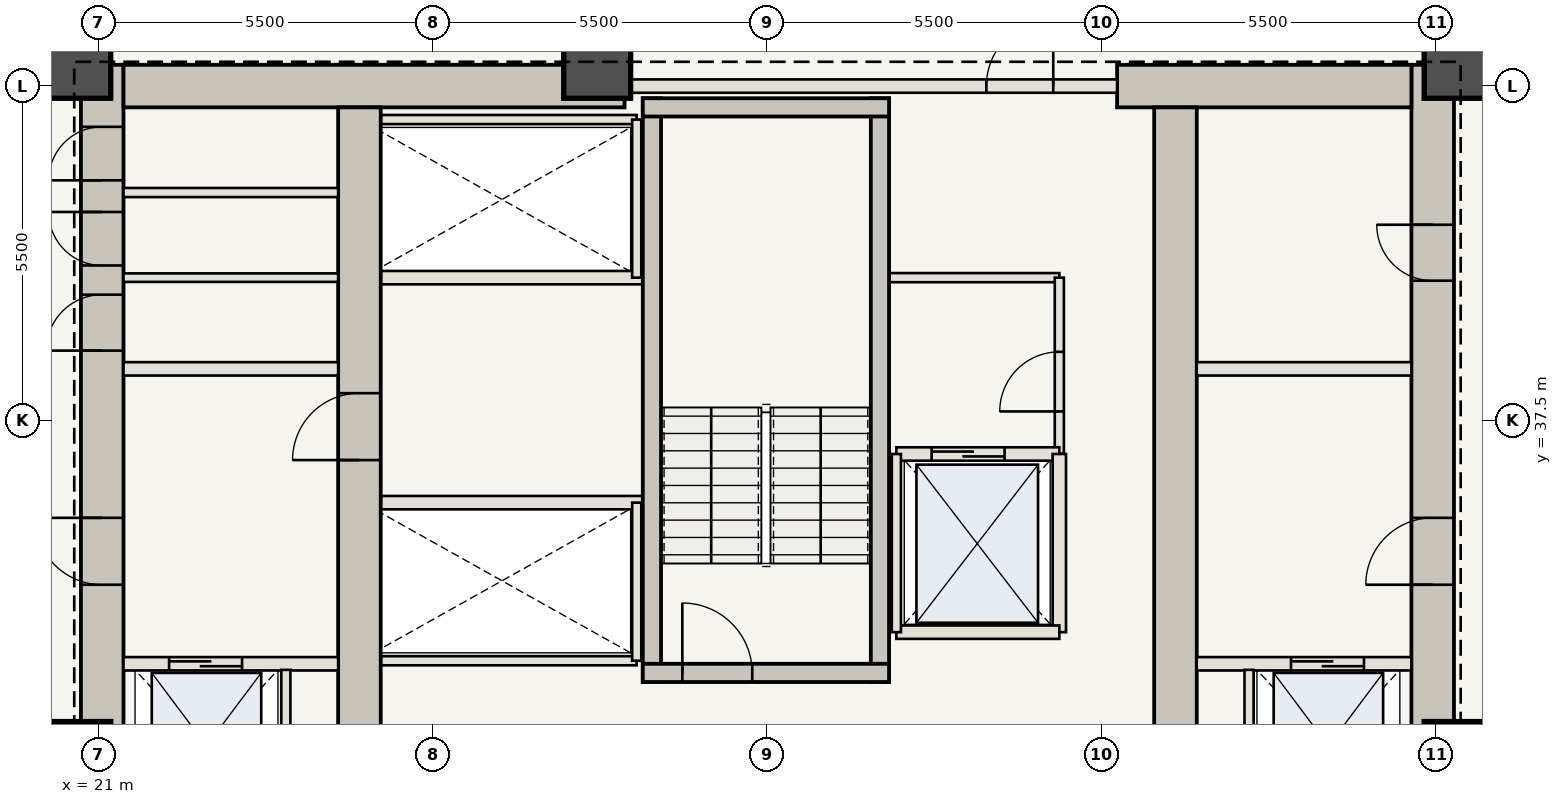
"""IFC4 building model, lengths in metres.
Left out: names, types, materials, properties, quantities, classifications, styles, units other than length and angle.
Written with IfcOpenShell. Run it as: python <this file> out.ifc"""

import sys

from ifc_helpers import new_model, si_unit, direction, frame, frame_2d, origin, origin_2d, place, context, subcontext, project, spatial, rectangle, extrude, element, fill, save


model = new_model("IFC4")
c1 = context("Model", 3, precision=1e-05, world=origin(), true_north=direction((0.0, 1.0)))
c2 = subcontext(c1, "Body", "Model", "MODEL_VIEW")
j1 = project(units=[si_unit("LENGTHUNIT", "METRE"), si_unit("PLANEANGLEUNIT", "RADIAN")], contexts=[c1])
p1 = place(None, origin())
s1 = spatial("IfcSite", under=j1, at=p1, CompositionType="ELEMENT")
p2 = place(p1, origin())
s2 = spatial("IfcBuilding", under=s1, at=p2, CompositionType="ELEMENT")
p3 = place(p2, frame((0.0, 0.0, 42.35)))
s3 = spatial("IfcBuildingStorey", under=s2, at=p3, CompositionType="ELEMENT", Elevation=42.35)
p4 = place(p3, frame((21.06, 30.6, 0.0), z_axis=(0.0, 0.0, 1.0), x_axis=(0.0, 1.0, 0.0)))
e1 = element("IfcWall", 1, at=p4, inside=s3, PredefinedType="SHEAR", context=c2, shape_type="SweptSolid", body=[
    extrude(rectangle(XDim=12.75, YDim=0.7, at=frame_2d((6.375, 0.0))), origin(), (0.0, 0.0, 1.0), 3.5),
])
p5 = place(p4, frame((4.2, 0.0, 0.0)))
e2 = element("IfcOpeningElement", 2, at=p5, cuts=e1, PredefinedType="OPENING", context=c2, shape_type="SweptSolid", body=[
    extrude(rectangle(XDim=1.1, YDim=2.15, at=frame_2d((0.55, 1.075))), frame((0.0, 0.36, 0.0), z_axis=(0.0, -1.0, 0.0), x_axis=(1.0, 0.0, 0.0)), (0.0, 0.0, 1.0), 0.72),
])
p6 = place(p4, frame((8.05, 0.0, 0.0)))
e3 = element("IfcOpeningElement", 3, at=p6, cuts=e1, PredefinedType="OPENING", context=c2, shape_type="SweptSolid", body=[
    extrude(rectangle(XDim=0.92, YDim=2.1, at=frame_2d((0.46, 1.05))), frame((0.0, 0.36, 0.0), z_axis=(0.0, -1.0, 0.0), x_axis=(1.0, 0.0, 0.0)), (0.0, 0.0, 1.0), 0.72),
])
p7 = place(p4, frame((9.45, 0.0, 0.0)))
e4 = element("IfcOpeningElement", 4, at=p7, cuts=e1, PredefinedType="OPENING", context=c2, shape_type="SweptSolid", body=[
    extrude(rectangle(XDim=0.88, YDim=2.1, at=frame_2d((0.44, 1.05))), frame((0.0, 0.36, 0.0), z_axis=(0.0, -1.0, 0.0), x_axis=(1.0, 0.0, 0.0)), (0.0, 0.0, 1.0), 0.72),
])
p8 = place(p4, frame((10.85, 0.0, 0.0)))
e5 = element("IfcOpeningElement", 5, at=p8, cuts=e1, PredefinedType="OPENING", context=c2, shape_type="SweptSolid", body=[
    extrude(rectangle(XDim=0.88, YDim=2.1, at=frame_2d((0.44, 1.05))), frame((0.0, 0.36, 0.0), z_axis=(0.0, -1.0, 0.0), x_axis=(1.0, 0.0, 0.0)), (0.0, 0.0, 1.0), 0.72),
])
p9 = place(p3, frame((42.94, 30.6, 0.0), z_axis=(0.0, 0.0, 1.0), x_axis=(0.0, 1.0, 0.0)))
e6 = element("IfcWall", 6, at=p9, inside=s3, PredefinedType="SHEAR", context=c2, shape_type="SweptSolid", body=[
    extrude(rectangle(XDim=12.75, YDim=0.7, at=frame_2d((6.375, 0.0))), origin(), (0.0, 0.0, 1.0), 3.5),
])
p10 = place(p9, frame((4.2, 0.0, 0.0)))
e7 = element("IfcOpeningElement", 7, at=p10, cuts=e6, PredefinedType="OPENING", context=c2, shape_type="SweptSolid", body=[
    extrude(rectangle(XDim=1.1, YDim=2.15, at=frame_2d((0.55, 1.075))), frame((0.0, 0.36, 0.0), z_axis=(0.0, -1.0, 0.0), x_axis=(1.0, 0.0, 0.0)), (0.0, 0.0, 1.0), 0.72),
])
p11 = place(p9, frame((9.2, 0.0, 0.0)))
e8 = element("IfcOpeningElement", 8, at=p11, cuts=e6, PredefinedType="OPENING", context=c2, shape_type="SweptSolid", body=[
    extrude(rectangle(XDim=0.92, YDim=2.1, at=frame_2d((0.46, 1.05))), frame((0.0, 0.36, 0.0), z_axis=(0.0, -1.0, 0.0), x_axis=(1.0, 0.0, 0.0)), (0.0, 0.0, 1.0), 0.72),
])
p12 = place(p3, frame((21.41, 43.0, 0.0), z_axis=(0.0, 0.0, 1.0), x_axis=(1.0, 0.0, 0.0)))
e9 = element("IfcWall", 9, at=p12, inside=s3, PredefinedType="SHEAR", context=c2, shape_type="SweptSolid", body=[
    extrude(rectangle(XDim=8.24, YDim=0.7, at=frame_2d((4.12, 0.0))), origin(), (0.0, 0.0, 1.0), 3.5),
])
p13 = place(p3, frame((37.75, 43.0, 0.0), z_axis=(0.0, 0.0, 1.0), x_axis=(1.0, 0.0, 0.0)))
e10 = element("IfcWall", 10, at=p13, inside=s3, PredefinedType="SHEAR", context=c2, shape_type="SweptSolid", body=[
    extrude(rectangle(XDim=4.84, YDim=0.7, at=frame_2d((2.42, 0.0))), origin(), (0.0, 0.0, 1.0), 3.5),
])
p14 = place(p3, frame((25.29, 30.6, 0.0), z_axis=(0.0, 0.0, 1.0), x_axis=(0.0, 1.0, 0.0)))
e11 = element("IfcWall", 11, at=p14, inside=s3, PredefinedType="SHEAR", context=c2, shape_type="SweptSolid", body=[
    extrude(rectangle(XDim=12.05, YDim=0.7, at=frame_2d((6.025, 0.0))), origin(), (0.0, 0.0, 1.0), 3.5),
])
p15 = place(p14, frame((6.25, 0.0, 0.0)))
e12 = element("IfcOpeningElement", 12, at=p15, cuts=e11, PredefinedType="OPENING", context=c2, shape_type="SweptSolid", body=[
    extrude(rectangle(XDim=1.1, YDim=2.15, at=frame_2d((0.55, 1.075))), frame((0.0, 0.36, 0.0), z_axis=(0.0, -1.0, 0.0), x_axis=(1.0, 0.0, 0.0)), (0.0, 0.0, 1.0), 0.72),
])
p16 = place(p3, frame((38.71, 30.6, 0.0), z_axis=(0.0, 0.0, 1.0), x_axis=(0.0, 1.0, 0.0)))
e13 = element("IfcWall", 13, at=p16, inside=s3, PredefinedType="SHEAR", context=c2, shape_type="SweptSolid", body=[
    extrude(rectangle(XDim=12.05, YDim=0.7, at=frame_2d((6.025, 0.0))), origin(), (0.0, 0.0, 1.0), 3.5),
])
for number, where, z_axis, x_axis in (
    (14, (43.35, 32.0, 0.0), (0.0, 0.0, 1.0), (1.0, 0.0, 0.0)),
    (15, (43.35, 43.35, 0.0), (0.0, 0.0, 1.0), (1.0, 0.0, 0.0)),
    (16, (29.2, 43.35, 0.0), (0.0, 0.0, 1.0), (1.0, 0.0, 0.0)),
    (17, (20.65, 43.35, 0.0), (0.0, 0.0, 1.0), (1.0, 0.0, 0.0)),
    (18, (20.65, 32.0, 0.0), (0.0, 0.0, 1.0), (1.0, 0.0, 0.0)),
):
    element("IfcColumn", number, at=place(p3, frame(where, z_axis=z_axis, x_axis=x_axis)), inside=s3, PredefinedType="COLUMN", context=c2, shape_type="SweptSolid", body=[
        extrude(rectangle(XDim=1.1, YDim=1.1, at=origin_2d()), origin(), (0.0, 0.0, 1.0), 3.5),
    ])
p17 = place(p3, frame((21.41, 33.5, 0.0), z_axis=(0.0, 0.0, 1.0), x_axis=(1.0, 0.0, 0.0)))
e19 = element("IfcWall", 19, at=p17, inside=s3, PredefinedType="STANDARD", context=c2, shape_type="SweptSolid", body=[
    extrude(rectangle(XDim=3.53, YDim=0.22, at=frame_2d((1.765, 0.0))), origin(), (0.0, 0.0, 1.0), 3.32),
])
p18 = place(p17, frame((0.75, 0.0, 0.0)))
e20 = element("IfcOpeningElement", 20, at=p18, cuts=e19, PredefinedType="OPENING", context=c2, shape_type="SweptSolid", body=[
    extrude(rectangle(XDim=1.2, YDim=2.2, at=frame_2d((0.6, 1.1))), frame((0.0, 0.12, 0.0), z_axis=(0.0, -1.0, 0.0), x_axis=(1.0, 0.0, 0.0)), (0.0, 0.0, 1.0), 0.24),
])
p19 = place(p3, frame((24.08, 30.75, 0.0), z_axis=(0.0, 0.0, 1.0), x_axis=(0.0, 1.0, 0.0)))
e21 = element("IfcWall", 21, at=p19, inside=s3, PredefinedType="STANDARD", context=c2, shape_type="SweptSolid", body=[
    extrude(rectangle(XDim=2.65, YDim=0.15, at=frame_2d((1.325, 0.0))), origin(), (0.0, 0.0, 1.0), 3.32),
])
p20 = place(p3, frame((39.06, 33.5, 0.0), z_axis=(0.0, 0.0, 1.0), x_axis=(1.0, 0.0, 0.0)))
e22 = element("IfcWall", 22, at=p20, inside=s3, PredefinedType="STANDARD", context=c2, shape_type="SweptSolid", body=[
    extrude(rectangle(XDim=3.53, YDim=0.22, at=frame_2d((1.765, 0.0))), origin(), (0.0, 0.0, 1.0), 3.32),
])
p21 = place(p20, frame((1.55, 0.0, 0.0)))
e23 = element("IfcOpeningElement", 23, at=p21, cuts=e22, PredefinedType="OPENING", context=c2, shape_type="SweptSolid", body=[
    extrude(rectangle(XDim=1.2, YDim=2.2, at=frame_2d((0.6, 1.1))), frame((0.0, 0.12, 0.0), z_axis=(0.0, -1.0, 0.0), x_axis=(1.0, 0.0, 0.0)), (0.0, 0.0, 1.0), 0.24),
])
p22 = place(p3, frame((39.92, 30.75, 0.0), z_axis=(0.0, 0.0, 1.0), x_axis=(0.0, 1.0, 0.0)))
e24 = element("IfcWall", 24, at=p22, inside=s3, PredefinedType="STANDARD", context=c2, shape_type="SweptSolid", body=[
    extrude(rectangle(XDim=2.65, YDim=0.15, at=frame_2d((1.325, 0.0))), origin(), (0.0, 0.0, 1.0), 3.32),
])
for number, where, z_axis, x_axis in (
    (25, (21.41, 38.35, 0.0), (0.0, 0.0, 1.0), (1.0, 0.0, 0.0)),
    (26, (39.06, 38.35, 0.0), (0.0, 0.0, 1.0), (1.0, 0.0, 0.0)),
):
    element("IfcWall", number, at=place(p3, frame(where, z_axis=z_axis, x_axis=x_axis)), inside=s3, PredefinedType="STANDARD", context=c2, shape_type="SweptSolid", body=[
        extrude(rectangle(XDim=3.53, YDim=0.22, at=frame_2d((1.765, 0.0))), origin(), (0.0, 0.0, 1.0), 3.32),
    ])
p23 = place(p3, frame((21.41, 39.85, 0.0), z_axis=(0.0, 0.0, 1.0), x_axis=(1.0, 0.0, 0.0)))
e27 = element("IfcWall", 27, at=p23, inside=s3, PredefinedType="STANDARD", context=c2, shape_type="SweptSolid", body=[
    extrude(rectangle(XDim=3.53, YDim=0.14, at=frame_2d((1.765, 0.0))), origin(), (0.0, 0.0, 1.0), 3.32),
])
p24 = place(p3, frame((21.41, 41.25, 0.0), z_axis=(0.0, 0.0, 1.0), x_axis=(1.0, 0.0, 0.0)))
e28 = element("IfcWall", 28, at=p24, inside=s3, PredefinedType="STANDARD", context=c2, shape_type="SweptSolid", body=[
    extrude(rectangle(XDim=3.53, YDim=0.15, at=frame_2d((1.765, 0.0))), origin(), (0.0, 0.0, 1.0), 3.32),
])
p25 = place(p3, frame((34.0, 39.85, 0.0), z_axis=(0.0, 0.0, 1.0), x_axis=(1.0, 0.0, 0.0)))
e29 = element("IfcWall", 29, at=p25, inside=s3, PredefinedType="STANDARD", context=c2, shape_type="SweptSolid", body=[
    extrude(rectangle(XDim=2.8, YDim=0.15, at=frame_2d((1.4, 0.0))), origin(), (0.0, 0.0, 1.0), 3.32),
])
p26 = place(p3, frame((36.8, 36.95, 0.0), z_axis=(0.0, 0.0, 1.0), x_axis=(0.0, 1.0, 0.0)))
e30 = element("IfcWall", 30, at=p26, inside=s3, PredefinedType="STANDARD", context=c2, shape_type="SweptSolid", body=[
    extrude(rectangle(XDim=2.9, YDim=0.15, at=frame_2d((1.45, 0.0))), origin(), (0.0, 0.0, 1.0), 3.32),
])
p27 = place(p26, frame((0.7, 0.0, 0.0)))
e31 = element("IfcOpeningElement", 31, at=p27, cuts=e30, PredefinedType="OPENING", context=c2, shape_type="SweptSolid", body=[
    extrude(rectangle(XDim=0.98, YDim=2.2, at=frame_2d((0.49, 1.1))), frame((0.0, 0.085, 0.0), z_axis=(0.0, -1.0, 0.0), x_axis=(1.0, 0.0, 0.0)), (0.0, 0.0, 1.0), 0.17),
])
p28 = place(p3, frame((25.65, 36.15, 0.0), z_axis=(0.0, 0.0, 1.0), x_axis=(1.0, 0.0, 0.0)))
e32 = element("IfcWall", 32, at=p28, inside=s3, PredefinedType="STANDARD", context=c2, shape_type="SweptSolid", body=[
    extrude(rectangle(XDim=4.3, YDim=0.22, at=frame_2d((2.15, 0.0))), origin(), (0.0, 0.0, 1.0), 3.32),
])
p29 = place(p3, frame((25.65, 33.55, 0.0), z_axis=(0.0, 0.0, 1.0), x_axis=(1.0, 0.0, 0.0)))
e33 = element("IfcWall", 33, at=p29, inside=s3, PredefinedType="STANDARD", context=c2, shape_type="SweptSolid", body=[
    extrude(rectangle(XDim=4.2, YDim=0.15, at=frame_2d((2.1, 0.0))), origin(), (0.0, 0.0, 1.0), 3.32),
])
p30 = place(p3, frame((29.85, 33.55, 0.0), z_axis=(0.0, 0.0, 1.0), x_axis=(0.0, 1.0, 0.0)))
e34 = element("IfcWall", 34, at=p30, inside=s3, PredefinedType="STANDARD", context=c2, shape_type="SweptSolid", body=[
    extrude(rectangle(XDim=2.6, YDim=0.15, at=frame_2d((1.3, 0.0))), origin(), (0.0, 0.0, 1.0), 3.32),
])
p31 = place(p3, frame((25.65, 39.85, 0.0), z_axis=(0.0, 0.0, 1.0), x_axis=(1.0, 0.0, 0.0)))
e35 = element("IfcWall", 35, at=p31, inside=s3, PredefinedType="STANDARD", context=c2, shape_type="SweptSolid", body=[
    extrude(rectangle(XDim=4.3, YDim=0.22, at=frame_2d((2.15, 0.0))), origin(), (0.0, 0.0, 1.0), 3.32),
])
p32 = place(p3, frame((25.65, 42.45, 0.0), z_axis=(0.0, 0.0, 1.0), x_axis=(1.0, 0.0, 0.0)))
e36 = element("IfcWall", 36, at=p32, inside=s3, PredefinedType="STANDARD", context=c2, shape_type="SweptSolid", body=[
    extrude(rectangle(XDim=4.2, YDim=0.15, at=frame_2d((2.1, 0.0))), origin(), (0.0, 0.0, 1.0), 3.32),
])
p33 = place(p3, frame((29.85, 39.85, 0.0), z_axis=(0.0, 0.0, 1.0), x_axis=(0.0, 1.0, 0.0)))
e37 = element("IfcWall", 37, at=p33, inside=s3, PredefinedType="STANDARD", context=c2, shape_type="SweptSolid", body=[
    extrude(rectangle(XDim=2.6, YDim=0.15, at=frame_2d((1.3, 0.0))), origin(), (0.0, 0.0, 1.0), 3.32),
])
for number, where, z_axis, x_axis in (
    (38, (30.1, 33.2, 0.0), (0.0, 0.0, 1.0), (0.0, 1.0, 0.0)),
    (39, (33.85, 33.2, 0.0), (0.0, 0.0, 1.0), (0.0, 1.0, 0.0)),
):
    element("IfcWall", number, at=place(p3, frame(where, z_axis=z_axis, x_axis=x_axis)), inside=s3, PredefinedType="SHEAR", context=c2, shape_type="SweptSolid", body=[
        extrude(rectangle(XDim=9.6, YDim=0.3, at=frame_2d((4.8, 0.0))), origin(), (0.0, 0.0, 1.0), 3.32),
    ])
p34 = place(p3, frame((29.95, 33.35, 0.0), z_axis=(0.0, 0.0, 1.0), x_axis=(1.0, 0.0, 0.0)))
e40 = element("IfcWall", 40, at=p34, inside=s3, PredefinedType="SHEAR", context=c2, shape_type="SweptSolid", body=[
    extrude(rectangle(XDim=4.05, YDim=0.3, at=frame_2d((2.025, 0.0))), origin(), (0.0, 0.0, 1.0), 3.32),
])
p35 = place(p34, frame((0.65, 0.0, 0.0)))
e41 = element("IfcOpeningElement", 41, at=p35, cuts=e40, PredefinedType="OPENING", context=c2, shape_type="SweptSolid", body=[
    extrude(rectangle(XDim=1.15, YDim=2.15, at=frame_2d((0.575, 1.075))), frame((0.0, 0.16, 0.0), z_axis=(0.0, -1.0, 0.0), x_axis=(1.0, 0.0, 0.0)), (0.0, 0.0, 1.0), 0.32),
])
p36 = place(p3, frame((29.95, 42.65, 0.0), z_axis=(0.0, 0.0, 1.0), x_axis=(1.0, 0.0, 0.0)))
e42 = element("IfcWall", 42, at=p36, inside=s3, PredefinedType="SHEAR", context=c2, shape_type="SweptSolid", body=[
    extrude(rectangle(XDim=4.05, YDim=0.3, at=frame_2d((2.025, 0.0))), origin(), (0.0, 0.0, 1.0), 3.32),
])
p37 = place(p3, frame((29.65, 43.0, 0.0), z_axis=(0.0, 0.0, 1.0), x_axis=(1.0, 0.0, 0.0)))
e43 = element("IfcWall", 43, at=p37, inside=s3, PredefinedType="STANDARD", context=c2, shape_type="SweptSolid", body=[
    extrude(rectangle(XDim=8.1, YDim=0.22, at=frame_2d((4.05, 0.0))), origin(), (0.0, 0.0, 1.0), 3.32),
])
p38 = place(p37, frame((5.95, 0.0, 0.0)))
e44 = element("IfcOpeningElement", 44, at=p38, cuts=e43, PredefinedType="OPENING", context=c2, shape_type="SweptSolid", body=[
    extrude(rectangle(XDim=1.1, YDim=2.15, at=frame_2d((0.55, 1.075))), frame((0.0, 0.12, 0.0), z_axis=(0.0, -1.0, 0.0), x_axis=(1.0, 0.0, 0.0)), (0.0, 0.0, 1.0), 0.24),
])
p39 = place(p3, frame((34.12, 36.95, 0.0), z_axis=(0.0, 0.0, 1.0), x_axis=(1.0, 0.0, 0.0)))
e45 = element("IfcWall", 45, at=p39, inside=s3, PredefinedType="STANDARD", context=c2, shape_type="SweptSolid", body=[
    extrude(rectangle(XDim=2.68, YDim=0.22, at=frame_2d((1.34, 0.0))), origin(), (0.0, 0.0, 1.0), 3.32),
])
p40 = place(p39, frame((0.58, 0.0, 0.0)))
e46 = element("IfcOpeningElement", 46, at=p40, cuts=e45, PredefinedType="OPENING", context=c2, shape_type="SweptSolid", body=[
    extrude(rectangle(XDim=1.2, YDim=2.2, at=frame_2d((0.6, 1.1))), frame((0.0, 0.12, 0.0), z_axis=(0.0, -1.0, 0.0), x_axis=(1.0, 0.0, 0.0)), (0.0, 0.0, 1.0), 0.24),
])
p41 = place(p3, frame((36.8, 34.02, 0.0), z_axis=(0.0, 0.0, 1.0), x_axis=(0.0, 1.0, 0.0)))
e47 = element("IfcWall", 47, at=p41, inside=s3, PredefinedType="STANDARD", context=c2, shape_type="SweptSolid", body=[
    extrude(rectangle(XDim=2.93, YDim=0.22, at=frame_2d((1.465, 0.0))), origin(), (0.0, 0.0, 1.0), 3.32),
])
p42 = place(p3, frame((34.12, 34.02, 0.0), z_axis=(0.0, 0.0, 1.0), x_axis=(1.0, 0.0, 0.0)))
e48 = element("IfcWall", 48, at=p42, inside=s3, PredefinedType="STANDARD", context=c2, shape_type="SweptSolid", body=[
    extrude(rectangle(XDim=2.68, YDim=0.22, at=frame_2d((1.34, 0.0))), origin(), (0.0, 0.0, 1.0), 3.32),
])
p43 = place(p3, frame((34.12, 34.02, 0.0), z_axis=(0.0, 0.0, 1.0), x_axis=(0.0, 1.0, 0.0)))
e49 = element("IfcWall", 49, at=p43, inside=s3, PredefinedType="STANDARD", context=c2, shape_type="SweptSolid", body=[
    extrude(rectangle(XDim=2.93, YDim=0.15, at=frame_2d((1.465, 0.0))), origin(), (0.0, 0.0, 1.0), 3.32),
])
p44 = place(p5, origin())
e50 = element("IfcDoor", 50, at=p44, inside=s3, OperationType="SINGLE_SWING_RIGHT", PredefinedType="DOOR", context=c2, shape_type="SweptSolid", body=[
    extrude(rectangle(XDim=1.1, YDim=2.15, at=frame_2d((0.55, 1.075))), frame((0.0, 0.025, 0.0), z_axis=(0.0, -1.0, 0.0), x_axis=(1.0, 0.0, 0.0)), (0.0, 0.0, 1.0), 0.05),
])
fill(e2, e50)
p45 = place(p10, origin())
e51 = element("IfcDoor", 51, at=p45, inside=s3, OperationType="SINGLE_SWING_LEFT", PredefinedType="DOOR", context=c2, shape_type="SweptSolid", body=[
    extrude(rectangle(XDim=1.1, YDim=2.15, at=frame_2d((0.55, 1.075))), frame((0.0, 0.025, 0.0), z_axis=(0.0, -1.0, 0.0), x_axis=(1.0, 0.0, 0.0)), (0.0, 0.0, 1.0), 0.05),
])
fill(e7, e51)
p46 = place(p15, origin())
e52 = element("IfcDoor", 52, at=p46, inside=s3, OperationType="SINGLE_SWING_LEFT", PredefinedType="DOOR", context=c2, shape_type="SweptSolid", body=[
    extrude(rectangle(XDim=1.1, YDim=2.15, at=frame_2d((0.55, 1.075))), frame((0.0, 0.025, 0.0), z_axis=(0.0, -1.0, 0.0), x_axis=(1.0, 0.0, 0.0)), (0.0, 0.0, 1.0), 0.05),
])
fill(e12, e52)
p47 = place(p6, origin())
e53 = element("IfcDoor", 53, at=p47, inside=s3, OperationType="SINGLE_SWING_LEFT", PredefinedType="DOOR", context=c2, shape_type="SweptSolid", body=[
    extrude(rectangle(XDim=0.92, YDim=2.1, at=frame_2d((0.46, 1.05))), frame((0.0, 0.025, 0.0), z_axis=(0.0, -1.0, 0.0), x_axis=(1.0, 0.0, 0.0)), (0.0, 0.0, 1.0), 0.05),
])
fill(e3, e53)
p48 = place(p7, origin())
e54 = element("IfcDoor", 54, at=p48, inside=s3, OperationType="SINGLE_SWING_RIGHT", PredefinedType="DOOR", context=c2, shape_type="SweptSolid", body=[
    extrude(rectangle(XDim=0.88, YDim=2.1, at=frame_2d((0.44, 1.05))), frame((0.0, 0.025, 0.0), z_axis=(0.0, -1.0, 0.0), x_axis=(1.0, 0.0, 0.0)), (0.0, 0.0, 1.0), 0.05),
])
fill(e4, e54)
p49 = place(p8, origin())
e55 = element("IfcDoor", 55, at=p49, inside=s3, OperationType="SINGLE_SWING_LEFT", PredefinedType="DOOR", context=c2, shape_type="SweptSolid", body=[
    extrude(rectangle(XDim=0.88, YDim=2.1, at=frame_2d((0.44, 1.05))), frame((0.0, 0.025, 0.0), z_axis=(0.0, -1.0, 0.0), x_axis=(1.0, 0.0, 0.0)), (0.0, 0.0, 1.0), 0.05),
])
fill(e5, e55)
p50 = place(p11, origin())
e56 = element("IfcDoor", 56, at=p50, inside=s3, OperationType="SINGLE_SWING_RIGHT", PredefinedType="DOOR", context=c2, shape_type="SweptSolid", body=[
    extrude(rectangle(XDim=0.92, YDim=2.1, at=frame_2d((0.46, 1.05))), frame((0.0, 0.025, 0.0), z_axis=(0.0, -1.0, 0.0), x_axis=(1.0, 0.0, 0.0)), (0.0, 0.0, 1.0), 0.05),
])
fill(e8, e56)
p51 = place(p18, origin())
e57 = element("IfcDoor", 57, at=p51, inside=s3, OperationType="DOUBLE_DOOR_SLIDING", PredefinedType="DOOR", context=c2, shape_type="SweptSolid", body=[
    extrude(rectangle(XDim=1.2, YDim=2.2, at=frame_2d((0.6, 1.1))), frame((0.0, 0.025, 0.0), z_axis=(0.0, -1.0, 0.0), x_axis=(1.0, 0.0, 0.0)), (0.0, 0.0, 1.0), 0.05),
])
fill(e20, e57)
p52 = place(p21, origin())
e58 = element("IfcDoor", 58, at=p52, inside=s3, OperationType="DOUBLE_DOOR_SLIDING", PredefinedType="DOOR", context=c2, shape_type="SweptSolid", body=[
    extrude(rectangle(XDim=1.2, YDim=2.2, at=frame_2d((0.6, 1.1))), frame((0.0, 0.025, 0.0), z_axis=(0.0, -1.0, 0.0), x_axis=(1.0, 0.0, 0.0)), (0.0, 0.0, 1.0), 0.05),
])
fill(e23, e58)
p53 = place(p27, origin())
e59 = element("IfcDoor", 59, at=p53, inside=s3, OperationType="SINGLE_SWING_LEFT", PredefinedType="DOOR", context=c2, shape_type="SweptSolid", body=[
    extrude(rectangle(XDim=0.98, YDim=2.2, at=frame_2d((0.49, 1.1))), frame((0.0, 0.025, 0.0), z_axis=(0.0, -1.0, 0.0), x_axis=(1.0, 0.0, 0.0)), (0.0, 0.0, 1.0), 0.05),
])
fill(e31, e59)
p54 = place(p35, origin())
e60 = element("IfcDoor", 60, at=p54, inside=s3, OperationType="SINGLE_SWING_LEFT", PredefinedType="DOOR", context=c2, shape_type="SweptSolid", body=[
    extrude(rectangle(XDim=1.15, YDim=2.15, at=frame_2d((0.575, 1.075))), frame((0.0, 0.025, 0.0), z_axis=(0.0, -1.0, 0.0), x_axis=(1.0, 0.0, 0.0)), (0.0, 0.0, 1.0), 0.05),
])
fill(e41, e60)
p55 = place(p38, origin())
e61 = element("IfcDoor", 61, at=p55, inside=s3, OperationType="SINGLE_SWING_RIGHT", PredefinedType="DOOR", context=c2, shape_type="SweptSolid", body=[
    extrude(rectangle(XDim=1.1, YDim=2.15, at=frame_2d((0.55, 1.075))), frame((0.0, 0.025, 0.0), z_axis=(0.0, -1.0, 0.0), x_axis=(1.0, 0.0, 0.0)), (0.0, 0.0, 1.0), 0.05),
])
fill(e44, e61)
p56 = place(p40, origin())
e62 = element("IfcDoor", 62, at=p56, inside=s3, OperationType="DOUBLE_DOOR_SLIDING", PredefinedType="DOOR", context=c2, shape_type="SweptSolid", body=[
    extrude(rectangle(XDim=1.2, YDim=2.2, at=frame_2d((0.6, 1.1))), frame((0.0, 0.025, 0.0), z_axis=(0.0, -1.0, 0.0), x_axis=(1.0, 0.0, 0.0)), (0.0, 0.0, 1.0), 0.05),
])
fill(e46, e62)
save(model, sys.argv[1])
